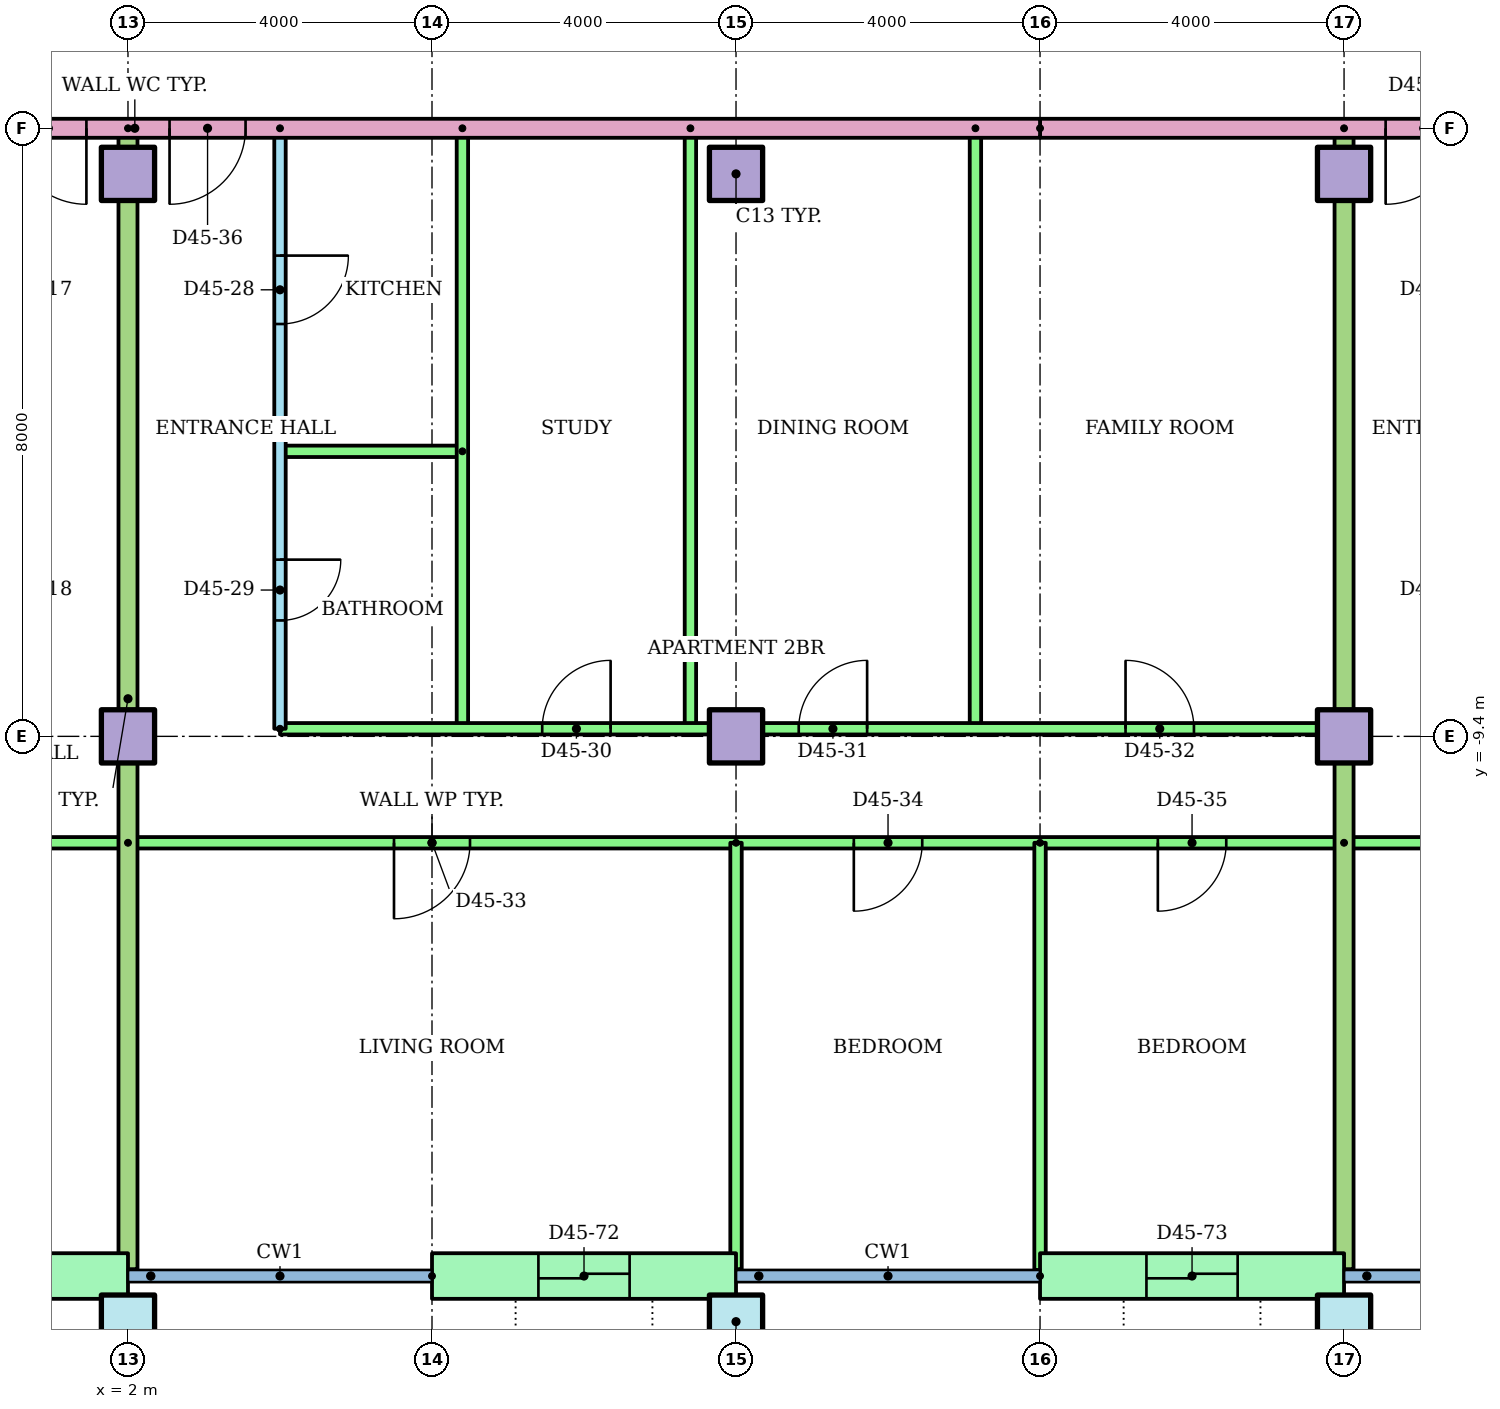
"""IFC4 building model, lengths in metres.
Left out: names, types, materials, properties, quantities, classifications, styles, units other than length and angle.
Written with IfcOpenShell. Run it as: python <this file> out.ifc"""

import sys

from ifc_helpers import new_model, si_unit, direction, frame, frame_2d, origin, origin_2d, place, context, subcontext, project, spatial, rectangle, hollow_rectangle, extrude, element, fill, save


model = new_model("IFC4")
c1 = context("Model", 3, precision=1e-05, world=origin(), true_north=direction((0.0, 1.0)))
c2 = subcontext(c1, "Body", "Model", "MODEL_VIEW")
j1 = project(units=[si_unit("LENGTHUNIT", "METRE"), si_unit("PLANEANGLEUNIT", "RADIAN")], contexts=[c1])
p1 = place(None, origin())
s1 = spatial("IfcSite", under=j1, at=p1, CompositionType="ELEMENT")
p2 = place(p1, origin())
s2 = spatial("IfcBuilding", under=s1, at=p2, CompositionType="ELEMENT")
p3 = place(p2, frame((0.0, 0.0, 174.9)))
s3 = spatial("IfcBuildingStorey", under=s2, at=p3, CompositionType="ELEMENT", Elevation=174.9)
for number, where in (
    (1, (2.0, -17.1, 0.0)),
    (2, (10.0, -17.1, 0.0)),
    (3, (18.0, -17.1, 0.0)),
):
    element("IfcColumn", number, at=place(p3, frame(where)), inside=s3, PredefinedType="COLUMN", context=c2, shape_type="SweptSolid", body=[
        extrude(hollow_rectangle(XDim=0.7, YDim=0.7, WallThickness=0.036, at=origin_2d()), origin(), (0.0, 0.0, 1.0), 3.2),
    ])
for number, where in (
    (4, (2.0, -9.4, 0.0)),
    (5, (10.0, -9.4, 0.0)),
    (6, (18.0, -9.4, 0.0)),
    (7, (2.0, -2.0, 0.0)),
    (8, (10.0, -2.0, 0.0)),
    (9, (18.0, -2.0, 0.0)),
):
    element("IfcColumn", number, at=place(p3, frame(where)), inside=s3, PredefinedType="COLUMN", context=c2, shape_type="SweptSolid", body=[
        extrude(rectangle(XDim=0.7, YDim=0.7, at=origin_2d()), origin(), (0.0, 0.0, 1.0), 3.2),
    ])
p4 = place(p3, frame((-2.0, -16.5, 0.0)))
e10 = element("IfcWall", 10, at=p4, inside=s3, PredefinedType="STANDARD", context=c2, shape_type="SweptSolid", body=[
    extrude(rectangle(XDim=4.0, YDim=0.6, at=frame_2d((2.0, 0.0))), origin(), (0.0, 0.0, 1.0), 2.92),
])
p5 = place(p4, frame((1.4, 0.0, 0.0)))
e11 = element("IfcOpeningElement", 11, at=p5, cuts=e10, PredefinedType="OPENING", context=c2, shape_type="SweptSolid", body=[
    extrude(rectangle(XDim=1.2, YDim=2.1, at=frame_2d((0.6, 1.05))), frame((0.0, 0.31, 0.0), z_axis=(0.0, -1.0, 0.0), x_axis=(1.0, 0.0, 0.0)), (0.0, 0.0, 1.0), 0.62),
])
p6 = place(p3, frame((6.0, -16.5, 0.0)))
e12 = element("IfcWall", 12, at=p6, inside=s3, PredefinedType="STANDARD", context=c2, shape_type="SweptSolid", body=[
    extrude(rectangle(XDim=4.0, YDim=0.6, at=frame_2d((2.0, 0.0))), origin(), (0.0, 0.0, 1.0), 2.92),
])
p7 = place(p6, frame((1.4, 0.0, 0.0)))
e13 = element("IfcOpeningElement", 13, at=p7, cuts=e12, PredefinedType="OPENING", context=c2, shape_type="SweptSolid", body=[
    extrude(rectangle(XDim=1.2, YDim=2.1, at=frame_2d((0.6, 1.05))), frame((0.0, 0.31, 0.0), z_axis=(0.0, -1.0, 0.0), x_axis=(1.0, 0.0, 0.0)), (0.0, 0.0, 1.0), 0.62),
])
p8 = place(p3, frame((14.0, -16.5, 0.0)))
e14 = element("IfcWall", 14, at=p8, inside=s3, PredefinedType="STANDARD", context=c2, shape_type="SweptSolid", body=[
    extrude(rectangle(XDim=4.0, YDim=0.6, at=frame_2d((2.0, 0.0))), origin(), (0.0, 0.0, 1.0), 2.92),
])
p9 = place(p8, frame((1.4, 0.0, 0.0)))
e15 = element("IfcOpeningElement", 15, at=p9, cuts=e14, PredefinedType="OPENING", context=c2, shape_type="SweptSolid", body=[
    extrude(rectangle(XDim=1.2, YDim=2.1, at=frame_2d((0.6, 1.05))), frame((0.0, 0.31, 0.0), z_axis=(0.0, -1.0, 0.0), x_axis=(1.0, 0.0, 0.0)), (0.0, 0.0, 1.0), 0.62),
])
p10 = place(p3, frame((2.0, -10.8, 0.0), z_axis=(0.0, 0.0, 1.0), x_axis=(-1.0, 0.0, 0.0)))
e16 = element("IfcWall", 16, at=p10, inside=s3, PredefinedType="PARTITIONING", context=c2, shape_type="SweptSolid", body=[
    extrude(rectangle(XDim=26.82, YDim=0.15, at=frame_2d((13.41, 0.0))), origin(), (0.0, 0.0, 1.0), 2.4),
])
p11 = place(p10, frame((20.8, 0.0, 0.0)))
e17 = element("IfcOpeningElement", 17, at=p11, cuts=e16, PredefinedType="OPENING", context=c2, shape_type="SweptSolid", body=[
    extrude(rectangle(XDim=1.0, YDim=2.1, at=frame_2d((0.5, 1.05))), frame((0.0, 0.085, 0.0), z_axis=(0.0, -1.0, 0.0), x_axis=(1.0, 0.0, 0.0)), (0.0, 0.0, 1.0), 0.17),
])
p12 = place(p10, frame((13.55, 0.0, 0.0)))
e18 = element("IfcOpeningElement", 18, at=p12, cuts=e16, PredefinedType="OPENING", context=c2, shape_type="SweptSolid", body=[
    extrude(rectangle(XDim=0.9, YDim=2.1, at=frame_2d((0.45, 1.05))), frame((0.0, 0.085, 0.0), z_axis=(0.0, -1.0, 0.0), x_axis=(1.0, 0.0, 0.0)), (0.0, 0.0, 1.0), 0.17),
])
p13 = place(p10, frame((9.55, 0.0, 0.0)))
e19 = element("IfcOpeningElement", 19, at=p13, cuts=e16, PredefinedType="OPENING", context=c2, shape_type="SweptSolid", body=[
    extrude(rectangle(XDim=0.9, YDim=2.1, at=frame_2d((0.45, 1.05))), frame((0.0, 0.085, 0.0), z_axis=(0.0, -1.0, 0.0), x_axis=(1.0, 0.0, 0.0)), (0.0, 0.0, 1.0), 0.17),
])
p14 = place(p10, frame((5.55, 0.0, 0.0)))
e20 = element("IfcOpeningElement", 20, at=p14, cuts=e16, PredefinedType="OPENING", context=c2, shape_type="SweptSolid", body=[
    extrude(rectangle(XDim=0.9, YDim=2.1, at=frame_2d((0.45, 1.05))), frame((0.0, 0.085, 0.0), z_axis=(0.0, -1.0, 0.0), x_axis=(1.0, 0.0, 0.0)), (0.0, 0.0, 1.0), 0.17),
])
p15 = place(p10, frame((1.55, 0.0, 0.0)))
e21 = element("IfcOpeningElement", 21, at=p15, cuts=e16, PredefinedType="OPENING", context=c2, shape_type="SweptSolid", body=[
    extrude(rectangle(XDim=0.9, YDim=2.1, at=frame_2d((0.45, 1.05))), frame((0.0, 0.085, 0.0), z_axis=(0.0, -1.0, 0.0), x_axis=(1.0, 0.0, 0.0)), (0.0, 0.0, 1.0), 0.17),
])
p16 = place(p3, frame((4.0, -1.4, 0.0), z_axis=(0.0, 0.0, 1.0), x_axis=(0.0, -1.0, 0.0)))
e22 = element("IfcWall", 22, at=p16, inside=s3, PredefinedType="PARTITIONING", context=c2, shape_type="SweptSolid", body=[
    extrude(rectangle(XDim=7.9, YDim=0.15, at=frame_2d((3.95, 0.0))), origin(), (0.0, 0.0, 1.0), 2.4),
])
p17 = place(p16, frame((1.675, 0.0, 0.0)))
e23 = element("IfcOpeningElement", 23, at=p17, cuts=e22, PredefinedType="OPENING", context=c2, shape_type="SweptSolid", body=[
    extrude(rectangle(XDim=0.9, YDim=2.1, at=frame_2d((0.45, 1.05))), frame((0.0, 0.085, 0.0), z_axis=(0.0, -1.0, 0.0), x_axis=(1.0, 0.0, 0.0)), (0.0, 0.0, 1.0), 0.17),
])
p18 = place(p16, frame((5.675, 0.0, 0.0)))
e24 = element("IfcOpeningElement", 24, at=p18, cuts=e22, PredefinedType="OPENING", context=c2, shape_type="SweptSolid", body=[
    extrude(rectangle(XDim=0.8, YDim=2.1, at=frame_2d((0.4, 1.05))), frame((0.0, 0.085, 0.0), z_axis=(0.0, -1.0, 0.0), x_axis=(1.0, 0.0, 0.0)), (0.0, 0.0, 1.0), 0.17),
])
p19 = place(p3, frame((6.4, -5.65, 0.0), z_axis=(0.0, 0.0, 1.0), x_axis=(-1.0, 0.0, 0.0)))
e25 = element("IfcWall", 25, at=p19, inside=s3, PredefinedType="PARTITIONING", context=c2, shape_type="SweptSolid", body=[
    extrude(rectangle(XDim=2.4, YDim=0.15, at=frame_2d((1.2, 0.0))), origin(), (0.0, 0.0, 1.0), 2.4),
])
for number, where, z_axis, x_axis in (
    (26, (6.4, -1.4, 0.0), (0.0, 0.0, 1.0), (0.0, -1.0, 0.0)),
    (27, (9.4, -1.4, 0.0), (0.0, 0.0, 1.0), (0.0, -1.0, 0.0)),
    (28, (13.15, -1.4, 0.0), (0.0, 0.0, 1.0), (0.0, -1.0, 0.0)),
):
    element("IfcWall", number, at=place(p3, frame(where, z_axis=z_axis, x_axis=x_axis)), inside=s3, PredefinedType="PARTITIONING", context=c2, shape_type="SweptSolid", body=[
        extrude(rectangle(XDim=7.9, YDim=0.15, at=frame_2d((3.95, 0.0))), origin(), (0.0, 0.0, 1.0), 2.4),
    ])
p20 = place(p3, frame((4.0, -9.3, 0.0)))
e29 = element("IfcWall", 29, at=p20, inside=s3, PredefinedType="PARTITIONING", context=c2, shape_type="SweptSolid", body=[
    extrude(rectangle(XDim=14.0, YDim=0.15, at=frame_2d((7.0, 0.0))), origin(), (0.0, 0.0, 1.0), 2.4),
])
p21 = place(p20, frame((3.45, 0.0, 0.0)))
e30 = element("IfcOpeningElement", 30, at=p21, cuts=e29, PredefinedType="OPENING", context=c2, shape_type="SweptSolid", body=[
    extrude(rectangle(XDim=0.9, YDim=2.1, at=frame_2d((0.45, 1.05))), frame((0.0, 0.085, 0.0), z_axis=(0.0, -1.0, 0.0), x_axis=(1.0, 0.0, 0.0)), (0.0, 0.0, 1.0), 0.17),
])
p22 = place(p20, frame((6.825, 0.0, 0.0)))
e31 = element("IfcOpeningElement", 31, at=p22, cuts=e29, PredefinedType="OPENING", context=c2, shape_type="SweptSolid", body=[
    extrude(rectangle(XDim=0.9, YDim=2.1, at=frame_2d((0.45, 1.05))), frame((0.0, 0.085, 0.0), z_axis=(0.0, -1.0, 0.0), x_axis=(1.0, 0.0, 0.0)), (0.0, 0.0, 1.0), 0.17),
])
p23 = place(p20, frame((11.125, 0.0, 0.0)))
e32 = element("IfcOpeningElement", 32, at=p23, cuts=e29, PredefinedType="OPENING", context=c2, shape_type="SweptSolid", body=[
    extrude(rectangle(XDim=0.9, YDim=2.1, at=frame_2d((0.45, 1.05))), frame((0.0, 0.085, 0.0), z_axis=(0.0, -1.0, 0.0), x_axis=(1.0, 0.0, 0.0)), (0.0, 0.0, 1.0), 0.17),
])
p24 = place(p3, frame((18.0, -10.8, 0.0), z_axis=(0.0, 0.0, 1.0), x_axis=(-1.0, 0.0, 0.0)))
e33 = element("IfcWall", 33, at=p24, inside=s3, PredefinedType="PARTITIONING", context=c2, shape_type="SweptSolid", body=[
    extrude(rectangle(XDim=16.0, YDim=0.15, at=frame_2d((8.0, 0.0))), origin(), (0.0, 0.0, 1.0), 2.4),
])
p25 = place(p24, frame((11.5, 0.0, 0.0)))
e34 = element("IfcOpeningElement", 34, at=p25, cuts=e33, PredefinedType="OPENING", context=c2, shape_type="SweptSolid", body=[
    extrude(rectangle(XDim=1.0, YDim=2.1, at=frame_2d((0.5, 1.05))), frame((0.0, 0.085, 0.0), z_axis=(0.0, -1.0, 0.0), x_axis=(1.0, 0.0, 0.0)), (0.0, 0.0, 1.0), 0.17),
])
p26 = place(p24, frame((5.55, 0.0, 0.0)))
e35 = element("IfcOpeningElement", 35, at=p26, cuts=e33, PredefinedType="OPENING", context=c2, shape_type="SweptSolid", body=[
    extrude(rectangle(XDim=0.9, YDim=2.1, at=frame_2d((0.45, 1.05))), frame((0.0, 0.085, 0.0), z_axis=(0.0, -1.0, 0.0), x_axis=(1.0, 0.0, 0.0)), (0.0, 0.0, 1.0), 0.17),
])
p27 = place(p24, frame((1.55, 0.0, 0.0)))
e36 = element("IfcOpeningElement", 36, at=p27, cuts=e33, PredefinedType="OPENING", context=c2, shape_type="SweptSolid", body=[
    extrude(rectangle(XDim=0.9, YDim=2.1, at=frame_2d((0.45, 1.05))), frame((0.0, 0.085, 0.0), z_axis=(0.0, -1.0, 0.0), x_axis=(1.0, 0.0, 0.0)), (0.0, 0.0, 1.0), 0.17),
])
p28 = place(p3, frame((10.0, -10.8, 0.0), z_axis=(0.0, 0.0, 1.0), x_axis=(0.0, -1.0, 0.0)))
e37 = element("IfcWall", 37, at=p28, inside=s3, PredefinedType="PARTITIONING", context=c2, shape_type="SweptSolid", body=[
    extrude(rectangle(XDim=5.61, YDim=0.15, at=frame_2d((2.805, 0.0))), origin(), (0.0, 0.0, 1.0), 2.4),
])
p29 = place(p3, frame((14.0, -10.8, 0.0), z_axis=(0.0, 0.0, 1.0), x_axis=(0.0, -1.0, 0.0)))
e38 = element("IfcWall", 38, at=p29, inside=s3, PredefinedType="PARTITIONING", context=c2, shape_type="SweptSolid", body=[
    extrude(rectangle(XDim=5.621, YDim=0.15, at=frame_2d((2.811, 0.0))), origin(), (0.0, 0.0, 1.0), 2.4),
])
p30 = place(p3, frame((2.0, -1.4, 0.0), z_axis=(0.0, 0.0, 1.0), x_axis=(0.0, -1.0, 0.0)))
e39 = element("IfcWall", 39, at=p30, inside=s3, PredefinedType="PARTITIONING", context=c2, shape_type="SweptSolid", body=[
    extrude(rectangle(XDim=15.01, YDim=0.25, at=frame_2d((7.505, 0.0))), origin(), (0.0, 0.0, 1.0), 2.4),
])
p31 = place(p3, frame((26.0, -10.8, 0.0), z_axis=(0.0, 0.0, 1.0), x_axis=(-1.0, 0.0, 0.0)))
e40 = element("IfcWall", 40, at=p31, inside=s3, PredefinedType="PARTITIONING", context=c2, shape_type="SweptSolid", body=[
    extrude(rectangle(XDim=8.0, YDim=0.15, at=frame_2d((4.0, 0.0))), origin(), (0.0, 0.0, 1.0), 2.4),
])
p32 = place(p31, frame((5.55, 0.0, 0.0)))
e41 = element("IfcOpeningElement", 41, at=p32, cuts=e40, PredefinedType="OPENING", context=c2, shape_type="SweptSolid", body=[
    extrude(rectangle(XDim=0.9, YDim=2.1, at=frame_2d((0.45, 1.05))), frame((0.0, 0.085, 0.0), z_axis=(0.0, -1.0, 0.0), x_axis=(1.0, 0.0, 0.0)), (0.0, 0.0, 1.0), 0.17),
])
p33 = place(p31, frame((1.5, 0.0, 0.0)))
e42 = element("IfcOpeningElement", 42, at=p33, cuts=e40, PredefinedType="OPENING", context=c2, shape_type="SweptSolid", body=[
    extrude(rectangle(XDim=1.0, YDim=2.1, at=frame_2d((0.5, 1.05))), frame((0.0, 0.085, 0.0), z_axis=(0.0, -1.0, 0.0), x_axis=(1.0, 0.0, 0.0)), (0.0, 0.0, 1.0), 0.17),
])
p34 = place(p3, frame((18.0, -1.4, 0.0), z_axis=(0.0, 0.0, 1.0), x_axis=(0.0, -1.0, 0.0)))
e43 = element("IfcWall", 43, at=p34, inside=s3, PredefinedType="PARTITIONING", context=c2, shape_type="SweptSolid", body=[
    extrude(rectangle(XDim=15.01, YDim=0.25, at=frame_2d((7.505, 0.0))), origin(), (0.0, 0.0, 1.0), 2.4),
])
p35 = place(p3, frame((29.0, -1.4, 0.0), z_axis=(0.0, 0.0, 1.0), x_axis=(-1.0, 0.0, 0.0)))
e44 = element("IfcWall", 44, at=p35, inside=s3, PredefinedType="PARTITIONING", context=c2, shape_type="SweptSolid", body=[
    extrude(rectangle(XDim=15.0, YDim=0.25, at=frame_2d((7.5, 0.0))), origin(), (0.0, 0.0, 1.0), 2.4),
])
p36 = place(p35, frame((9.453, 0.0, 0.0)))
e45 = element("IfcOpeningElement", 45, at=p36, cuts=e44, PredefinedType="OPENING", context=c2, shape_type="SweptSolid", body=[
    extrude(rectangle(XDim=1.0, YDim=2.1, at=frame_2d((0.5, 1.05))), frame((0.0, 0.135, 0.0), z_axis=(0.0, -1.0, 0.0), x_axis=(1.0, 0.0, 0.0)), (0.0, 0.0, 1.0), 0.27),
])
p37 = place(p35, frame((1.453, 0.0, 0.0)))
e46 = element("IfcOpeningElement", 46, at=p37, cuts=e44, PredefinedType="OPENING", context=c2, shape_type="SweptSolid", body=[
    extrude(rectangle(XDim=1.0, YDim=2.1, at=frame_2d((0.5, 1.05))), frame((0.0, 0.135, 0.0), z_axis=(0.0, -1.0, 0.0), x_axis=(1.0, 0.0, 0.0)), (0.0, 0.0, 1.0), 0.27),
])
p38 = place(p3, frame((14.0, -1.4, 0.0), z_axis=(0.0, 0.0, 1.0), x_axis=(-1.0, 0.0, 0.0)))
e47 = element("IfcWall", 47, at=p38, inside=s3, PredefinedType="PARTITIONING", context=c2, shape_type="SweptSolid", body=[
    extrude(rectangle(XDim=28.0, YDim=0.25, at=frame_2d((14.0, 0.0))), origin(), (0.0, 0.0, 1.0), 2.4),
])
p39 = place(p38, frame((12.547, 0.0, 0.0)))
e48 = element("IfcOpeningElement", 48, at=p39, cuts=e47, PredefinedType="OPENING", context=c2, shape_type="SweptSolid", body=[
    extrude(rectangle(XDim=1.0, YDim=2.1, at=frame_2d((0.5, 1.05))), frame((0.0, 0.135, 0.0), z_axis=(0.0, -1.0, 0.0), x_axis=(1.0, 0.0, 0.0)), (0.0, 0.0, 1.0), 0.27),
])
p40 = place(p38, frame((10.453, 0.0, 0.0)))
e49 = element("IfcOpeningElement", 49, at=p40, cuts=e47, PredefinedType="OPENING", context=c2, shape_type="SweptSolid", body=[
    extrude(rectangle(XDim=1.0, YDim=2.1, at=frame_2d((0.5, 1.05))), frame((0.0, 0.135, 0.0), z_axis=(0.0, -1.0, 0.0), x_axis=(1.0, 0.0, 0.0)), (0.0, 0.0, 1.0), 0.27),
])
p41 = place(p39, origin())
e50 = element("IfcDoor", 50, at=p41, inside=s3, OperationType="SINGLE_SWING_LEFT", PredefinedType="DOOR", context=c2, shape_type="SweptSolid", body=[
    extrude(rectangle(XDim=1.0, YDim=2.1, at=frame_2d((0.5, 1.05))), frame((0.0, 0.025, 0.0), z_axis=(0.0, -1.0, 0.0), x_axis=(1.0, 0.0, 0.0)), (0.0, 0.0, 1.0), 0.05),
])
fill(e48, e50)
p42 = place(p17, origin())
e51 = element("IfcDoor", 51, at=p42, inside=s3, OperationType="SINGLE_SWING_LEFT", PredefinedType="DOOR", context=c2, shape_type="SweptSolid", body=[
    extrude(rectangle(XDim=0.9, YDim=2.1, at=frame_2d((0.45, 1.05))), frame((0.0, 0.025, 0.0), z_axis=(0.0, -1.0, 0.0), x_axis=(1.0, 0.0, 0.0)), (0.0, 0.0, 1.0), 0.05),
])
fill(e23, e51)
p43 = place(p18, origin())
e52 = element("IfcDoor", 52, at=p43, inside=s3, OperationType="SINGLE_SWING_LEFT", PredefinedType="DOOR", context=c2, shape_type="SweptSolid", body=[
    extrude(rectangle(XDim=0.8, YDim=2.1, at=frame_2d((0.4, 1.05))), frame((0.0, 0.025, 0.0), z_axis=(0.0, -1.0, 0.0), x_axis=(1.0, 0.0, 0.0)), (0.0, 0.0, 1.0), 0.05),
])
fill(e24, e52)
p44 = place(p21, origin())
e53 = element("IfcDoor", 53, at=p44, inside=s3, OperationType="SINGLE_SWING_RIGHT", PredefinedType="DOOR", context=c2, shape_type="SweptSolid", body=[
    extrude(rectangle(XDim=0.9, YDim=2.1, at=frame_2d((0.45, 1.05))), frame((0.0, 0.025, 0.0), z_axis=(0.0, -1.0, 0.0), x_axis=(1.0, 0.0, 0.0)), (0.0, 0.0, 1.0), 0.05),
])
fill(e30, e53)
p45 = place(p22, origin())
e54 = element("IfcDoor", 54, at=p45, inside=s3, OperationType="SINGLE_SWING_RIGHT", PredefinedType="DOOR", context=c2, shape_type="SweptSolid", body=[
    extrude(rectangle(XDim=0.9, YDim=2.1, at=frame_2d((0.45, 1.05))), frame((0.0, 0.025, 0.0), z_axis=(0.0, -1.0, 0.0), x_axis=(1.0, 0.0, 0.0)), (0.0, 0.0, 1.0), 0.05),
])
fill(e31, e54)
p46 = place(p23, origin())
e55 = element("IfcDoor", 55, at=p46, inside=s3, OperationType="SINGLE_SWING_LEFT", PredefinedType="DOOR", context=c2, shape_type="SweptSolid", body=[
    extrude(rectangle(XDim=0.9, YDim=2.1, at=frame_2d((0.45, 1.05))), frame((0.0, 0.025, 0.0), z_axis=(0.0, -1.0, 0.0), x_axis=(1.0, 0.0, 0.0)), (0.0, 0.0, 1.0), 0.05),
])
fill(e32, e55)
p47 = place(p25, origin())
e56 = element("IfcDoor", 56, at=p47, inside=s3, OperationType="SINGLE_SWING_RIGHT", PredefinedType="DOOR", context=c2, shape_type="SweptSolid", body=[
    extrude(rectangle(XDim=1.0, YDim=2.1, at=frame_2d((0.5, 1.05))), frame((0.0, 0.025, 0.0), z_axis=(0.0, -1.0, 0.0), x_axis=(1.0, 0.0, 0.0)), (0.0, 0.0, 1.0), 0.05),
])
fill(e34, e56)
p48 = place(p26, origin())
e57 = element("IfcDoor", 57, at=p48, inside=s3, OperationType="SINGLE_SWING_RIGHT", PredefinedType="DOOR", context=c2, shape_type="SweptSolid", body=[
    extrude(rectangle(XDim=0.9, YDim=2.1, at=frame_2d((0.45, 1.05))), frame((0.0, 0.025, 0.0), z_axis=(0.0, -1.0, 0.0), x_axis=(1.0, 0.0, 0.0)), (0.0, 0.0, 1.0), 0.05),
])
fill(e35, e57)
p49 = place(p27, origin())
e58 = element("IfcDoor", 58, at=p49, inside=s3, OperationType="SINGLE_SWING_RIGHT", PredefinedType="DOOR", context=c2, shape_type="SweptSolid", body=[
    extrude(rectangle(XDim=0.9, YDim=2.1, at=frame_2d((0.45, 1.05))), frame((0.0, 0.025, 0.0), z_axis=(0.0, -1.0, 0.0), x_axis=(1.0, 0.0, 0.0)), (0.0, 0.0, 1.0), 0.05),
])
fill(e36, e58)
p50 = place(p40, origin())
e59 = element("IfcDoor", 59, at=p50, inside=s3, OperationType="SINGLE_SWING_RIGHT", PredefinedType="DOOR", context=c2, shape_type="SweptSolid", body=[
    extrude(rectangle(XDim=1.0, YDim=2.1, at=frame_2d((0.5, 1.05))), frame((0.0, 0.025, 0.0), z_axis=(0.0, -1.0, 0.0), x_axis=(1.0, 0.0, 0.0)), (0.0, 0.0, 1.0), 0.05),
])
fill(e49, e59)
p51 = place(p36, origin())
e60 = element("IfcDoor", 60, at=p51, inside=s3, OperationType="SINGLE_SWING_RIGHT", PredefinedType="DOOR", context=c2, shape_type="SweptSolid", body=[
    extrude(rectangle(XDim=1.0, YDim=2.1, at=frame_2d((0.5, 1.05))), frame((0.0, 0.025, 0.0), z_axis=(0.0, -1.0, 0.0), x_axis=(1.0, 0.0, 0.0)), (0.0, 0.0, 1.0), 0.05),
])
fill(e45, e60)
p52 = place(p7, origin())
e61 = element("IfcDoor", 61, at=p52, inside=s3, OperationType="SLIDING_TO_LEFT", PredefinedType="DOOR", context=c2, shape_type="SweptSolid", body=[
    extrude(rectangle(XDim=1.2, YDim=2.1, at=frame_2d((0.6, 1.05))), frame((0.0, 0.025, 0.0), z_axis=(0.0, -1.0, 0.0), x_axis=(1.0, 0.0, 0.0)), (0.0, 0.0, 1.0), 0.05),
])
fill(e13, e61)
p53 = place(p9, origin())
e62 = element("IfcDoor", 62, at=p53, inside=s3, OperationType="SLIDING_TO_LEFT", PredefinedType="DOOR", context=c2, shape_type="SweptSolid", body=[
    extrude(rectangle(XDim=1.2, YDim=2.1, at=frame_2d((0.6, 1.05))), frame((0.0, 0.025, 0.0), z_axis=(0.0, -1.0, 0.0), x_axis=(1.0, 0.0, 0.0)), (0.0, 0.0, 1.0), 0.05),
])
fill(e15, e62)
save(model, sys.argv[1])
